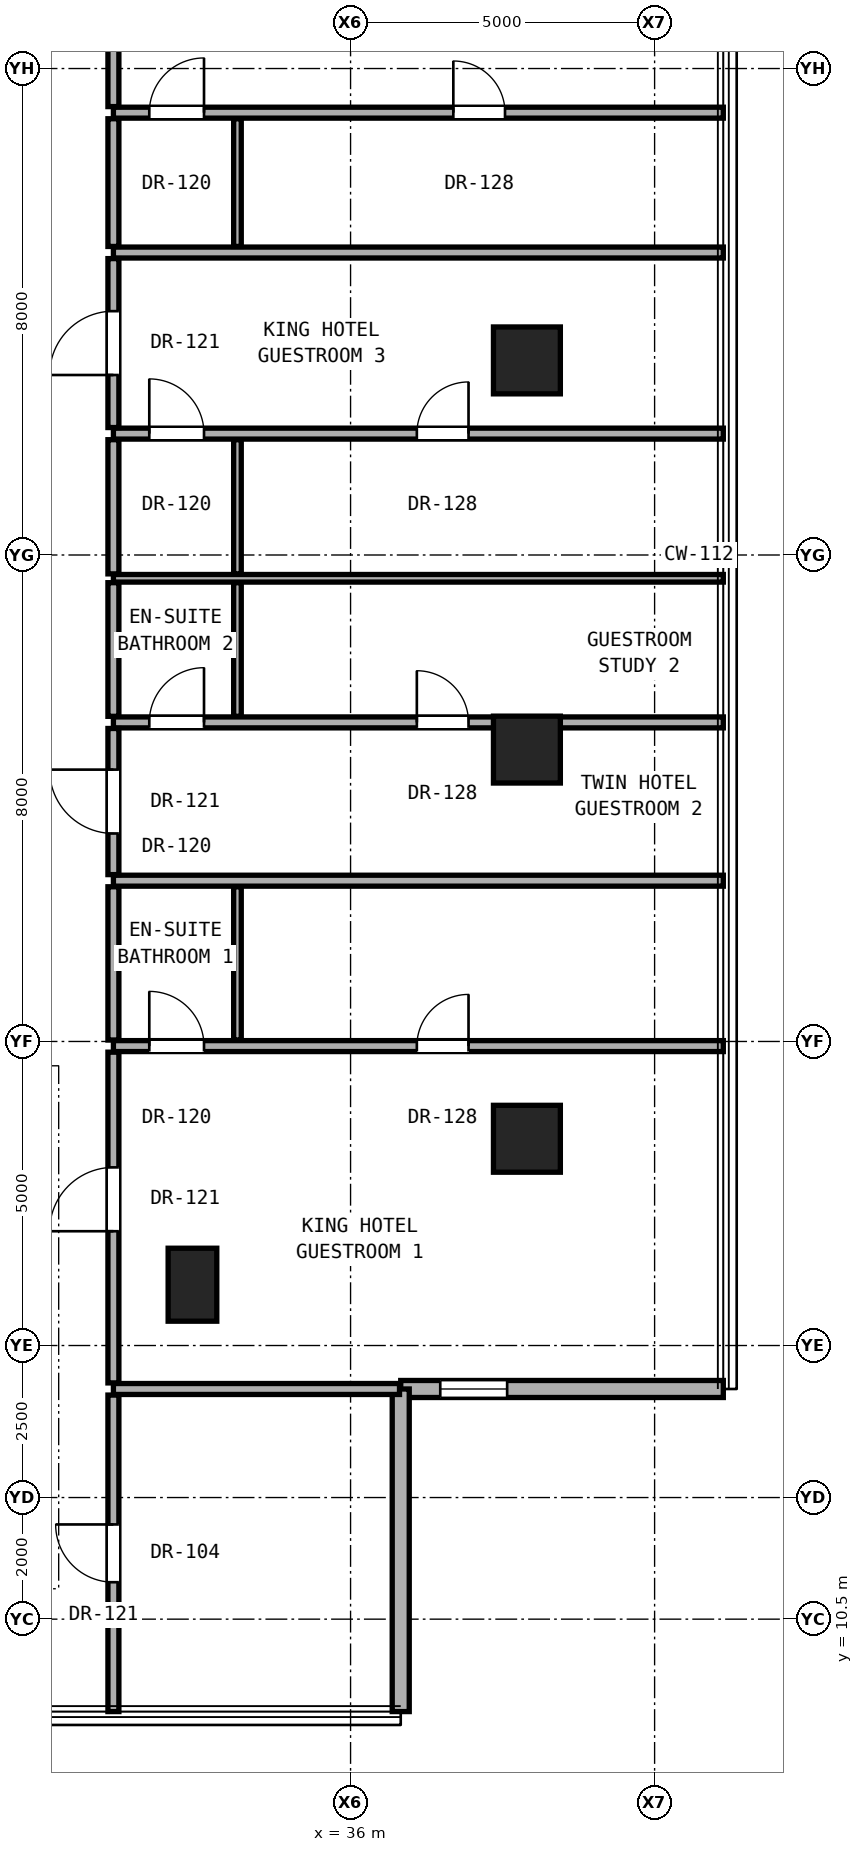
"""IFC4 building model, lengths in metres.
Left out: names, types, materials, properties, quantities, classifications, styles, units other than length and angle.
Written with IfcOpenShell. Run it as: python <this file> out.ifc"""

import sys

from ifc_helpers import new_model, si_unit, direction, frame, frame_2d, origin, origin_2d, place, context, subcontext, project, spatial, rectangle, hollow_rectangle, extrude, element, fill, save


model = new_model("IFC4")
c1 = context("Model", 3, precision=1e-05, world=origin(), true_north=direction((0.0, 1.0)))
c2 = subcontext(c1, "Body", "Model", "MODEL_VIEW")
j1 = project(units=[si_unit("LENGTHUNIT", "METRE"), si_unit("PLANEANGLEUNIT", "RADIAN")], contexts=[c1])
p1 = place(None, origin())
s1 = spatial("IfcSite", under=j1, at=p1, CompositionType="ELEMENT")
p2 = place(p1, origin())
s2 = spatial("IfcBuilding", under=s1, at=p2, CompositionType="ELEMENT")
p3 = place(p2, frame((0.0, 0.0, 104.9)))
s3 = spatial("IfcBuildingStorey", under=s2, at=p3, CompositionType="ELEMENT", Elevation=104.9)
for number, where, z_axis, x_axis in (
    (1, (38.9, 18.4, 0.0), (0.0, 0.0, 1.0), (1.0, 0.0, 0.0)),
    (2, (38.9, 24.8, 0.0), (0.0, 0.0, 1.0), (1.0, 0.0, 0.0)),
    (3, (38.9, 31.2, 0.0), (0.0, 0.0, 1.0), (1.0, 0.0, 0.0)),
):
    element("IfcColumn", number, at=place(p3, frame(where, z_axis=z_axis, x_axis=x_axis)), inside=s3, PredefinedType="COLUMN", context=c2, shape_type="SweptSolid", body=[
        extrude(hollow_rectangle(XDim=1.1, YDim=1.1, WallThickness=0.06, at=origin_2d()), origin(), (0.0, 0.0, 1.0), 3.3),
    ])
p4 = place(p3, frame((33.4, 16.0, 0.0), z_axis=(0.0, 0.0, 1.0), x_axis=(1.0, 0.0, 0.0)))
e4 = element("IfcColumn", 4, at=p4, inside=s3, PredefinedType="PILASTER", context=c2, shape_type="SweptSolid", body=[
    extrude(rectangle(XDim=0.8, YDim=1.2, at=origin_2d()), origin(), (0.0, 0.0, 1.0), 3.3),
])
p5 = place(p3, frame((36.825, 14.285, 0.0), z_axis=(0.0, 0.0, 1.0), x_axis=(1.0, 0.0, 0.0)))
e5 = element("IfcWall", 5, at=p5, inside=s3, PredefinedType="SOLIDWALL", context=c2, shape_type="SweptSolid", body=[
    extrude(rectangle(XDim=5.305, YDim=0.28, at=frame_2d((2.652, 0.0))), origin(), (0.0, 0.0, 1.0), 3.06),
])
p6 = place(p5, frame((0.65, 0.0, 0.85)))
e6 = element("IfcOpeningElement", 6, at=p6, cuts=e5, PredefinedType="OPENING", context=c2, shape_type="SweptSolid", body=[
    extrude(rectangle(XDim=1.1, YDim=2.0, at=frame_2d((0.55, 1.0))), frame((0.0, 0.15, 0.0), z_axis=(0.0, -1.0, 0.0), x_axis=(1.0, 0.0, 0.0)), (0.0, 0.0, 1.0), 0.3),
])
p7 = place(p3, frame((36.825, 8.98, 0.0), z_axis=(0.0, 0.0, 1.0), x_axis=(0.0, 1.0, 0.0)))
e7 = element("IfcWall", 7, at=p7, inside=s3, PredefinedType="SOLIDWALL", context=c2, shape_type="SweptSolid", body=[
    extrude(rectangle(XDim=5.305, YDim=0.28, at=frame_2d((2.652, 0.0))), origin(), (0.0, 0.0, 1.0), 3.06),
])
p8 = place(p3, frame((32.1, 14.285, 0.0), z_axis=(0.0, 0.0, 1.0), x_axis=(1.0, 0.0, 0.0)))
e8 = element("IfcWall", 8, at=p8, inside=s3, PredefinedType="PARTITIONING", context=c2, shape_type="SweptSolid", body=[
    extrude(rectangle(XDim=4.705, YDim=0.18, at=frame_2d((2.353, 0.0))), origin(), (0.0, 0.0, 1.0), 3.08),
])
p9 = place(p3, frame((32.1, 19.924, 0.0), z_axis=(0.0, 0.0, 1.0), x_axis=(1.0, 0.0, 0.0)))
e9 = element("IfcWall", 9, at=p9, inside=s3, PredefinedType="PARTITIONING", context=c2, shape_type="SweptSolid", body=[
    extrude(rectangle(XDim=10.03, YDim=0.18, at=frame_2d((5.015, 0.0))), origin(), (0.0, 0.0, 1.0), 2.145),
])
p10 = place(p9, frame((4.99, 0.0, 0.0)))
e10 = element("IfcOpeningElement", 10, at=p10, cuts=e9, PredefinedType="OPENING", context=c2, shape_type="SweptSolid", body=[
    extrude(rectangle(XDim=0.85, YDim=2.01, at=frame_2d((0.425, 1.005))), frame((0.0, 0.1, 0.0), z_axis=(0.0, -1.0, 0.0), x_axis=(1.0, 0.0, 0.0)), (0.0, 0.0, 1.0), 0.2),
])
p11 = place(p9, frame((0.59, 0.0, 0.0)))
e11 = element("IfcOpeningElement", 11, at=p11, cuts=e9, PredefinedType="OPENING", context=c2, shape_type="SweptSolid", body=[
    extrude(rectangle(XDim=0.9, YDim=2.1, at=frame_2d((0.45, 1.05))), frame((0.0, 0.1, 0.0), z_axis=(0.0, -1.0, 0.0), x_axis=(1.0, 0.0, 0.0)), (0.0, 0.0, 1.0), 0.2),
])
p12 = place(p3, frame((32.1, 22.644, 0.0), z_axis=(0.0, 0.0, 1.0), x_axis=(1.0, 0.0, 0.0)))
e12 = element("IfcWall", 12, at=p12, inside=s3, PredefinedType="PARTITIONING", context=c2, shape_type="SweptSolid", body=[
    extrude(rectangle(XDim=10.03, YDim=0.18, at=frame_2d((5.015, 0.0))), origin(), (0.0, 0.0, 1.0), 2.145),
])
p13 = place(p3, frame((32.1, 25.247, 0.0), z_axis=(0.0, 0.0, 1.0), x_axis=(1.0, 0.0, 0.0)))
e13 = element("IfcWall", 13, at=p13, inside=s3, PredefinedType="PARTITIONING", context=c2, shape_type="SweptSolid", body=[
    extrude(rectangle(XDim=10.03, YDim=0.18, at=frame_2d((5.015, 0.0))), origin(), (0.0, 0.0, 1.0), 2.145),
])
p14 = place(p13, frame((4.99, 0.0, 0.0)))
e14 = element("IfcOpeningElement", 14, at=p14, cuts=e13, PredefinedType="OPENING", context=c2, shape_type="SweptSolid", body=[
    extrude(rectangle(XDim=0.85, YDim=2.01, at=frame_2d((0.425, 1.005))), frame((0.0, 0.1, 0.0), z_axis=(0.0, -1.0, 0.0), x_axis=(1.0, 0.0, 0.0)), (0.0, 0.0, 1.0), 0.2),
])
p15 = place(p13, frame((0.59, 0.0, 0.0)))
e15 = element("IfcOpeningElement", 15, at=p15, cuts=e13, PredefinedType="OPENING", context=c2, shape_type="SweptSolid", body=[
    extrude(rectangle(XDim=0.9, YDim=2.1, at=frame_2d((0.45, 1.05))), frame((0.0, 0.1, 0.0), z_axis=(0.0, -1.0, 0.0), x_axis=(1.0, 0.0, 0.0)), (0.0, 0.0, 1.0), 0.2),
])
p16 = place(p3, frame((32.1, 27.617, 0.0), z_axis=(0.0, 0.0, 1.0), x_axis=(1.0, 0.0, 0.0)))
e16 = element("IfcWall", 16, at=p16, inside=s3, PredefinedType="PARTITIONING", context=c2, shape_type="SweptSolid", body=[
    extrude(rectangle(XDim=10.03, YDim=0.125, at=frame_2d((5.015, 0.0))), origin(), (0.0, 0.0, 1.0), 2.145),
])
p17 = place(p3, frame((32.1, 29.996, 0.0), z_axis=(0.0, 0.0, 1.0), x_axis=(1.0, 0.0, 0.0)))
e17 = element("IfcWall", 17, at=p17, inside=s3, PredefinedType="PARTITIONING", context=c2, shape_type="SweptSolid", body=[
    extrude(rectangle(XDim=10.03, YDim=0.18, at=frame_2d((5.015, 0.0))), origin(), (0.0, 0.0, 1.0), 2.145),
])
p18 = place(p17, frame((4.99, 0.0, 0.0)))
e18 = element("IfcOpeningElement", 18, at=p18, cuts=e17, PredefinedType="OPENING", context=c2, shape_type="SweptSolid", body=[
    extrude(rectangle(XDim=0.85, YDim=2.01, at=frame_2d((0.425, 1.005))), frame((0.0, 0.1, 0.0), z_axis=(0.0, -1.0, 0.0), x_axis=(1.0, 0.0, 0.0)), (0.0, 0.0, 1.0), 0.2),
])
p19 = place(p17, frame((0.59, 0.0, 0.0)))
e19 = element("IfcOpeningElement", 19, at=p19, cuts=e17, PredefinedType="OPENING", context=c2, shape_type="SweptSolid", body=[
    extrude(rectangle(XDim=0.9, YDim=2.1, at=frame_2d((0.45, 1.05))), frame((0.0, 0.1, 0.0), z_axis=(0.0, -1.0, 0.0), x_axis=(1.0, 0.0, 0.0)), (0.0, 0.0, 1.0), 0.2),
])
p20 = place(p3, frame((32.1, 32.974, 0.0), z_axis=(0.0, 0.0, 1.0), x_axis=(1.0, 0.0, 0.0)))
e20 = element("IfcWall", 20, at=p20, inside=s3, PredefinedType="PARTITIONING", context=c2, shape_type="SweptSolid", body=[
    extrude(rectangle(XDim=10.03, YDim=0.18, at=frame_2d((5.015, 0.0))), origin(), (0.0, 0.0, 1.0), 2.145),
])
p21 = place(p3, frame((32.1, 35.274, 0.0), z_axis=(0.0, 0.0, 1.0), x_axis=(1.0, 0.0, 0.0)))
e21 = element("IfcWall", 21, at=p21, inside=s3, PredefinedType="PARTITIONING", context=c2, shape_type="SweptSolid", body=[
    extrude(rectangle(XDim=10.03, YDim=0.18, at=frame_2d((5.015, 0.0))), origin(), (0.0, 0.0, 1.0), 2.145),
])
p22 = place(p21, frame((5.59, 0.0, 0.0)))
e22 = element("IfcOpeningElement", 22, at=p22, cuts=e21, PredefinedType="OPENING", context=c2, shape_type="SweptSolid", body=[
    extrude(rectangle(XDim=0.85, YDim=2.01, at=frame_2d((0.425, 1.005))), frame((0.0, 0.1, 0.0), z_axis=(0.0, -1.0, 0.0), x_axis=(1.0, 0.0, 0.0)), (0.0, 0.0, 1.0), 0.2),
])
p23 = place(p21, frame((0.59, 0.0, 0.0)))
e23 = element("IfcOpeningElement", 23, at=p23, cuts=e21, PredefinedType="OPENING", context=c2, shape_type="SweptSolid", body=[
    extrude(rectangle(XDim=0.9, YDim=2.1, at=frame_2d((0.45, 1.05))), frame((0.0, 0.1, 0.0), z_axis=(0.0, -1.0, 0.0), x_axis=(1.0, 0.0, 0.0)), (0.0, 0.0, 1.0), 0.2),
])
p24 = place(p3, frame((32.1, 8.98, 0.0), z_axis=(0.0, 0.0, 1.0), x_axis=(0.0, 1.0, 0.0)))
e24 = element("IfcWall", 24, at=p24, inside=s3, PredefinedType="PARTITIONING", context=c2, shape_type="SweptSolid", body=[
    extrude(rectangle(XDim=5.205, YDim=0.18, at=frame_2d((2.603, 0.0))), origin(), (0.0, 0.0, 1.0), 3.08),
])
p25 = place(p24, frame((2.127, 0.0, 0.0)))
e25 = element("IfcOpeningElement", 25, at=p25, cuts=e24, PredefinedType="OPENING", context=c2, shape_type="SweptSolid", body=[
    extrude(rectangle(XDim=0.95, YDim=2.15, at=frame_2d((0.475, 1.075))), frame((0.0, 0.1, 0.0), z_axis=(0.0, -1.0, 0.0), x_axis=(1.0, 0.0, 0.0)), (0.0, 0.0, 1.0), 0.2),
])
p26 = place(p3, frame((32.1, 14.385, 0.0), z_axis=(0.0, 0.0, 1.0), x_axis=(0.0, 1.0, 0.0)))
e26 = element("IfcWall", 26, at=p26, inside=s3, PredefinedType="PARTITIONING", context=c2, shape_type="SweptSolid", body=[
    extrude(rectangle(XDim=5.439, YDim=0.18, at=frame_2d((2.719, 0.0))), origin(), (0.0, 0.0, 1.0), 2.456),
])
p27 = place(p26, frame((2.494, 0.0, 0.0)))
e27 = element("IfcOpeningElement", 27, at=p27, cuts=e26, PredefinedType="OPENING", context=c2, shape_type="SweptSolid", body=[
    extrude(rectangle(XDim=1.05, YDim=2.2, at=frame_2d((0.525, 1.1))), frame((0.0, 0.1, 0.0), z_axis=(0.0, -1.0, 0.0), x_axis=(1.0, 0.0, 0.0)), (0.0, 0.0, 1.0), 0.2),
])
p28 = place(p3, frame((32.1, 20.024, 0.0), z_axis=(0.0, 0.0, 1.0), x_axis=(0.0, 1.0, 0.0)))
e28 = element("IfcWall", 28, at=p28, inside=s3, PredefinedType="PARTITIONING", context=c2, shape_type="SweptSolid", body=[
    extrude(rectangle(XDim=2.52, YDim=0.18, at=frame_2d((1.26, 0.0))), origin(), (0.0, 0.0, 1.0), 3.08),
])
p29 = place(p3, frame((32.1, 22.744, 0.0), z_axis=(0.0, 0.0, 1.0), x_axis=(0.0, 1.0, 0.0)))
e29 = element("IfcWall", 29, at=p29, inside=s3, PredefinedType="PARTITIONING", context=c2, shape_type="SweptSolid", body=[
    extrude(rectangle(XDim=2.403, YDim=0.18, at=frame_2d((1.202, 0.0))), origin(), (0.0, 0.0, 1.0), 2.299),
])
p30 = place(p29, frame((0.677, 0.0, 0.0)))
e30 = element("IfcOpeningElement", 30, at=p30, cuts=e29, PredefinedType="OPENING", context=c2, shape_type="SweptSolid", body=[
    extrude(rectangle(XDim=1.05, YDim=2.2, at=frame_2d((0.525, 1.1))), frame((0.0, 0.1, 0.0), z_axis=(0.0, -1.0, 0.0), x_axis=(1.0, 0.0, 0.0)), (0.0, 0.0, 1.0), 0.2),
])
p31 = place(p3, frame((32.1, 25.347, 0.0), z_axis=(0.0, 0.0, 1.0), x_axis=(0.0, 1.0, 0.0)))
e31 = element("IfcWall", 31, at=p31, inside=s3, PredefinedType="PARTITIONING", context=c2, shape_type="SweptSolid", body=[
    extrude(rectangle(XDim=2.198, YDim=0.18, at=frame_2d((1.099, 0.0))), origin(), (0.0, 0.0, 1.0), 3.08),
])
p32 = place(p3, frame((32.1, 27.689, 0.0), z_axis=(0.0, 0.0, 1.0), x_axis=(0.0, 1.0, 0.0)))
e32 = element("IfcWall", 32, at=p32, inside=s3, PredefinedType="PARTITIONING", context=c2, shape_type="SweptSolid", body=[
    extrude(rectangle(XDim=2.207, YDim=0.18, at=frame_2d((1.103, 0.0))), origin(), (0.0, 0.0, 1.0), 3.08),
])
p33 = place(p3, frame((32.1, 30.096, 0.0), z_axis=(0.0, 0.0, 1.0), x_axis=(0.0, 1.0, 0.0)))
e33 = element("IfcWall", 33, at=p33, inside=s3, PredefinedType="PARTITIONING", context=c2, shape_type="SweptSolid", body=[
    extrude(rectangle(XDim=2.778, YDim=0.18, at=frame_2d((1.389, 0.0))), origin(), (0.0, 0.0, 1.0), 2.299),
])
p34 = place(p33, frame((0.864, 0.0, 0.0)))
e34 = element("IfcOpeningElement", 34, at=p34, cuts=e33, PredefinedType="OPENING", context=c2, shape_type="SweptSolid", body=[
    extrude(rectangle(XDim=1.05, YDim=2.2, at=frame_2d((0.525, 1.1))), frame((0.0, 0.1, 0.0), z_axis=(0.0, -1.0, 0.0), x_axis=(1.0, 0.0, 0.0)), (0.0, 0.0, 1.0), 0.2),
])
p35 = place(p3, frame((32.1, 33.074, 0.0), z_axis=(0.0, 0.0, 1.0), x_axis=(0.0, 1.0, 0.0)))
e35 = element("IfcWall", 35, at=p35, inside=s3, PredefinedType="PARTITIONING", context=c2, shape_type="SweptSolid", body=[
    extrude(rectangle(XDim=2.1, YDim=0.18, at=frame_2d((1.05, 0.0))), origin(), (0.0, 0.0, 1.0), 3.08),
])
p36 = place(p3, frame((32.1, 35.374, 0.0), z_axis=(0.0, 0.0, 1.0), x_axis=(0.0, 1.0, 0.0)))
e36 = element("IfcWall", 36, at=p36, inside=s3, PredefinedType="PARTITIONING", context=c2, shape_type="SweptSolid", body=[
    extrude(rectangle(XDim=6.241, YDim=0.18, at=frame_2d((3.121, 0.0))), origin(), (0.0, 0.0, 1.0), 2.456),
])
p37 = place(p36, frame((2.595, 0.0, 0.0)))
e37 = element("IfcOpeningElement", 37, at=p37, cuts=e36, PredefinedType="OPENING", context=c2, shape_type="SweptSolid", body=[
    extrude(rectangle(XDim=1.05, YDim=2.2, at=frame_2d((0.525, 1.1))), frame((0.0, 0.1, 0.0), z_axis=(0.0, -1.0, 0.0), x_axis=(1.0, 0.0, 0.0)), (0.0, 0.0, 1.0), 0.2),
])
p38 = place(p3, frame((34.14, 20.024, 0.0), z_axis=(0.0, 0.0, 1.0), x_axis=(0.0, 1.0, 0.0)))
e38 = element("IfcWall", 38, at=p38, inside=s3, PredefinedType="PARTITIONING", context=c2, shape_type="SweptSolid", body=[
    extrude(rectangle(XDim=2.52, YDim=0.125, at=frame_2d((1.26, 0.0))), origin(), (0.0, 0.0, 1.0), 3.08),
])
p39 = place(p3, frame((34.14, 25.347, 0.0), z_axis=(0.0, 0.0, 1.0), x_axis=(0.0, 1.0, 0.0)))
e39 = element("IfcWall", 39, at=p39, inside=s3, PredefinedType="PARTITIONING", context=c2, shape_type="SweptSolid", body=[
    extrude(rectangle(XDim=2.198, YDim=0.125, at=frame_2d((1.099, 0.0))), origin(), (0.0, 0.0, 1.0), 3.08),
])
p40 = place(p3, frame((34.14, 27.689, 0.0), z_axis=(0.0, 0.0, 1.0), x_axis=(0.0, 1.0, 0.0)))
e40 = element("IfcWall", 40, at=p40, inside=s3, PredefinedType="PARTITIONING", context=c2, shape_type="SweptSolid", body=[
    extrude(rectangle(XDim=2.207, YDim=0.125, at=frame_2d((1.103, 0.0))), origin(), (0.0, 0.0, 1.0), 3.08),
])
p41 = place(p3, frame((34.14, 33.074, 0.0), z_axis=(0.0, 0.0, 1.0), x_axis=(0.0, 1.0, 0.0)))
e41 = element("IfcWall", 41, at=p41, inside=s3, PredefinedType="PARTITIONING", context=c2, shape_type="SweptSolid", body=[
    extrude(rectangle(XDim=2.1, YDim=0.125, at=frame_2d((1.05, 0.0))), origin(), (0.0, 0.0, 1.0), 3.08),
])
p42 = place(p6, origin())
e42 = element("IfcWindow", 42, at=p42, inside=s3, PartitioningType="SINGLE_PANEL", PredefinedType="WINDOW", context=c2, shape_type="SweptSolid", body=[
    extrude(rectangle(XDim=1.1, YDim=2.0, at=frame_2d((0.55, 1.0))), frame((0.0, 0.03, 0.0), z_axis=(0.0, -1.0, 0.0), x_axis=(1.0, 0.0, 0.0)), (0.0, 0.0, 1.0), 0.06),
])
fill(e6, e42)
p43 = place(p27, origin())
e43 = element("IfcDoor", 43, at=p43, inside=s3, OperationType="SINGLE_SWING_LEFT", PredefinedType="DOOR", context=c2, shape_type="SweptSolid", body=[
    extrude(rectangle(XDim=1.05, YDim=2.2, at=frame_2d((0.525, 1.1))), frame((0.0, 0.025, 0.0), z_axis=(0.0, -1.0, 0.0), x_axis=(1.0, 0.0, 0.0)), (0.0, 0.0, 1.0), 0.05),
])
fill(e27, e43)
p44 = place(p10, origin())
e44 = element("IfcDoor", 44, at=p44, inside=s3, OperationType="SINGLE_SWING_RIGHT", PredefinedType="DOOR", context=c2, shape_type="SweptSolid", body=[
    extrude(rectangle(XDim=0.85, YDim=2.01, at=frame_2d((0.425, 1.005))), frame((0.0, 0.025, 0.0), z_axis=(0.0, -1.0, 0.0), x_axis=(1.0, 0.0, 0.0)), (0.0, 0.0, 1.0), 0.05),
])
fill(e10, e44)
p45 = place(p11, origin())
e45 = element("IfcDoor", 45, at=p45, inside=s3, OperationType="SINGLE_SWING_LEFT", PredefinedType="DOOR", context=c2, shape_type="SweptSolid", body=[
    extrude(rectangle(XDim=0.9, YDim=2.1, at=frame_2d((0.45, 1.05))), frame((0.0, 0.025, 0.0), z_axis=(0.0, -1.0, 0.0), x_axis=(1.0, 0.0, 0.0)), (0.0, 0.0, 1.0), 0.05),
])
fill(e11, e45)
p46 = place(p30, origin())
e46 = element("IfcDoor", 46, at=p46, inside=s3, OperationType="SINGLE_SWING_RIGHT", PredefinedType="DOOR", context=c2, shape_type="SweptSolid", body=[
    extrude(rectangle(XDim=1.05, YDim=2.2, at=frame_2d((0.525, 1.1))), frame((0.0, 0.025, 0.0), z_axis=(0.0, -1.0, 0.0), x_axis=(1.0, 0.0, 0.0)), (0.0, 0.0, 1.0), 0.05),
])
fill(e30, e46)
p47 = place(p14, origin())
e47 = element("IfcDoor", 47, at=p47, inside=s3, OperationType="SINGLE_SWING_LEFT", PredefinedType="DOOR", context=c2, shape_type="SweptSolid", body=[
    extrude(rectangle(XDim=0.85, YDim=2.01, at=frame_2d((0.425, 1.005))), frame((0.0, 0.025, 0.0), z_axis=(0.0, -1.0, 0.0), x_axis=(1.0, 0.0, 0.0)), (0.0, 0.0, 1.0), 0.05),
])
fill(e14, e47)
p48 = place(p15, origin())
e48 = element("IfcDoor", 48, at=p48, inside=s3, OperationType="SINGLE_SWING_RIGHT", PredefinedType="DOOR", context=c2, shape_type="SweptSolid", body=[
    extrude(rectangle(XDim=0.9, YDim=2.1, at=frame_2d((0.45, 1.05))), frame((0.0, 0.025, 0.0), z_axis=(0.0, -1.0, 0.0), x_axis=(1.0, 0.0, 0.0)), (0.0, 0.0, 1.0), 0.05),
])
fill(e15, e48)
p49 = place(p34, origin())
e49 = element("IfcDoor", 49, at=p49, inside=s3, OperationType="SINGLE_SWING_LEFT", PredefinedType="DOOR", context=c2, shape_type="SweptSolid", body=[
    extrude(rectangle(XDim=1.05, YDim=2.2, at=frame_2d((0.525, 1.1))), frame((0.0, 0.025, 0.0), z_axis=(0.0, -1.0, 0.0), x_axis=(1.0, 0.0, 0.0)), (0.0, 0.0, 1.0), 0.05),
])
fill(e34, e49)
p50 = place(p18, origin())
e50 = element("IfcDoor", 50, at=p50, inside=s3, OperationType="SINGLE_SWING_RIGHT", PredefinedType="DOOR", context=c2, shape_type="SweptSolid", body=[
    extrude(rectangle(XDim=0.85, YDim=2.01, at=frame_2d((0.425, 1.005))), frame((0.0, 0.025, 0.0), z_axis=(0.0, -1.0, 0.0), x_axis=(1.0, 0.0, 0.0)), (0.0, 0.0, 1.0), 0.05),
])
fill(e18, e50)
p51 = place(p19, origin())
e51 = element("IfcDoor", 51, at=p51, inside=s3, OperationType="SINGLE_SWING_LEFT", PredefinedType="DOOR", context=c2, shape_type="SweptSolid", body=[
    extrude(rectangle(XDim=0.9, YDim=2.1, at=frame_2d((0.45, 1.05))), frame((0.0, 0.025, 0.0), z_axis=(0.0, -1.0, 0.0), x_axis=(1.0, 0.0, 0.0)), (0.0, 0.0, 1.0), 0.05),
])
fill(e19, e51)
p52 = place(p22, origin())
e52 = element("IfcDoor", 52, at=p52, inside=s3, OperationType="SINGLE_SWING_LEFT", PredefinedType="DOOR", context=c2, shape_type="SweptSolid", body=[
    extrude(rectangle(XDim=0.85, YDim=2.01, at=frame_2d((0.425, 1.005))), frame((0.0, 0.025, 0.0), z_axis=(0.0, -1.0, 0.0), x_axis=(1.0, 0.0, 0.0)), (0.0, 0.0, 1.0), 0.05),
])
fill(e22, e52)
p53 = place(p23, origin())
e53 = element("IfcDoor", 53, at=p53, inside=s3, OperationType="SINGLE_SWING_RIGHT", PredefinedType="DOOR", context=c2, shape_type="SweptSolid", body=[
    extrude(rectangle(XDim=0.9, YDim=2.1, at=frame_2d((0.45, 1.05))), frame((0.0, 0.025, 0.0), z_axis=(0.0, -1.0, 0.0), x_axis=(1.0, 0.0, 0.0)), (0.0, 0.0, 1.0), 0.05),
])
fill(e23, e53)
p54 = place(p25, origin())
e54 = element("IfcDoor", 54, at=p54, inside=s3, OperationType="SINGLE_SWING_RIGHT", PredefinedType="DOOR", context=c2, shape_type="SweptSolid", body=[
    extrude(rectangle(XDim=0.95, YDim=2.15, at=frame_2d((0.475, 1.075))), frame((0.0, 0.025, 0.0), z_axis=(0.0, -1.0, 0.0), x_axis=(1.0, 0.0, 0.0)), (0.0, 0.0, 1.0), 0.05),
])
fill(e25, e54)
save(model, sys.argv[1])
